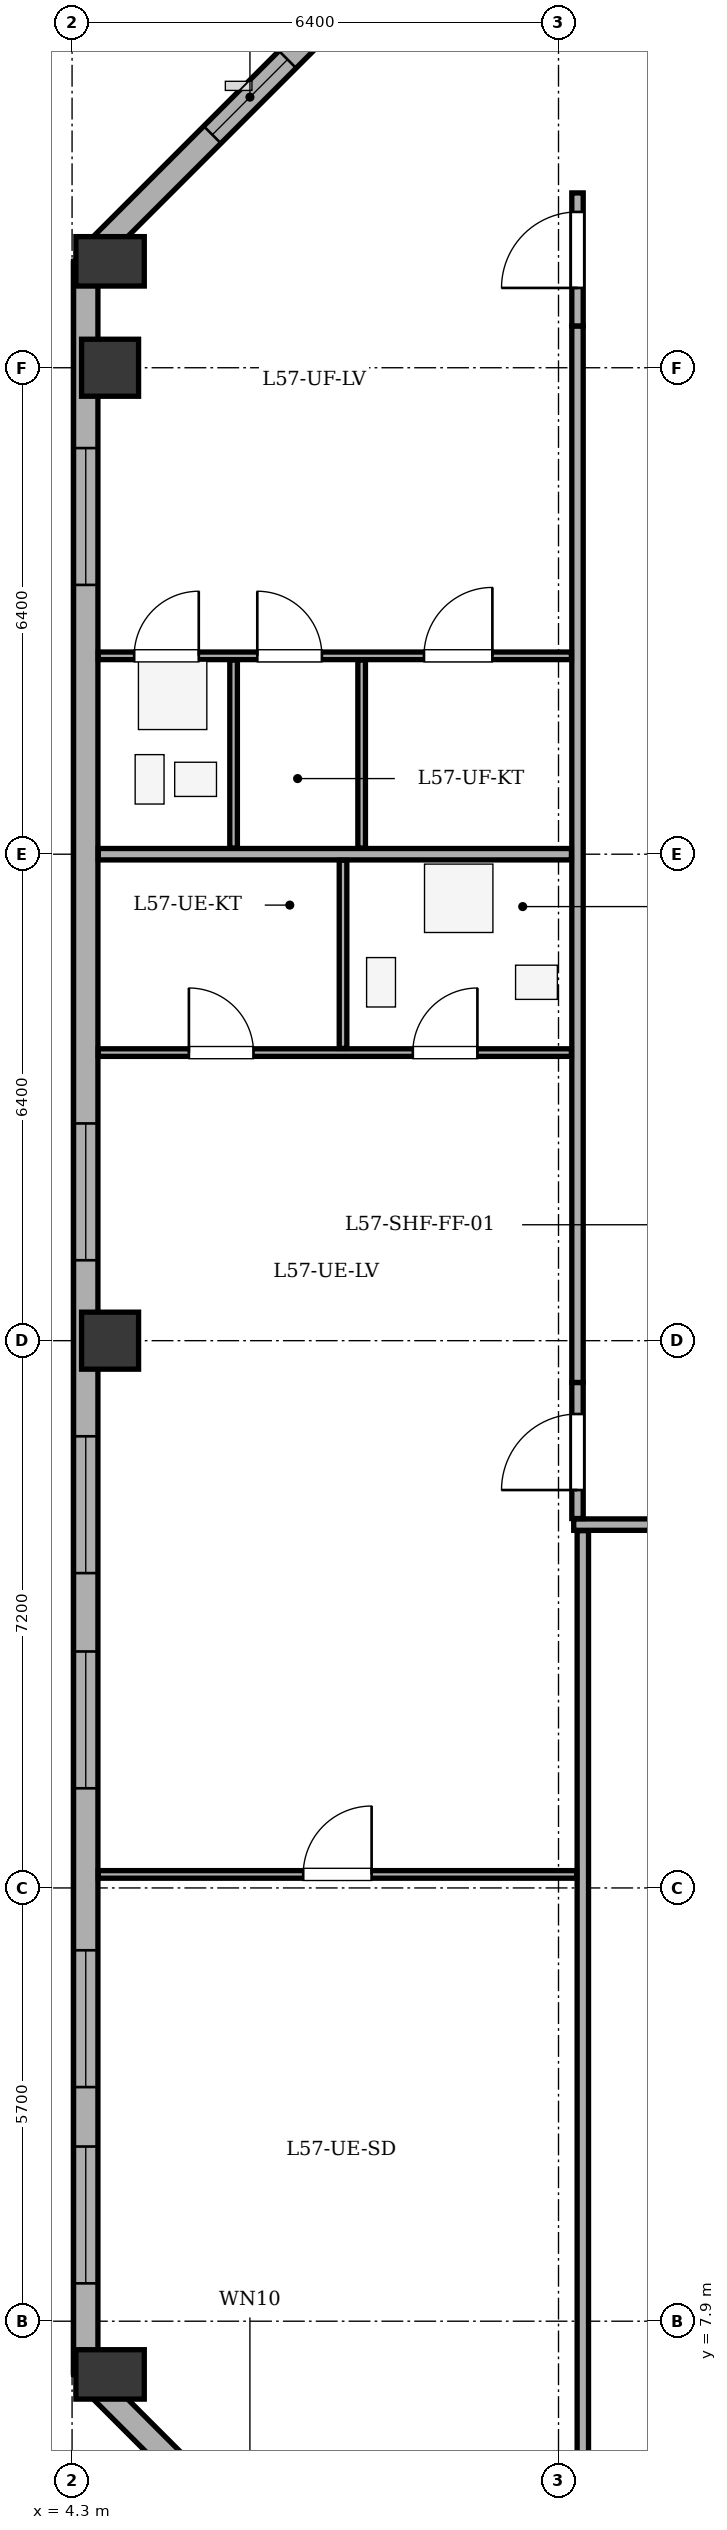
"""IFC4 building model, lengths in metres.
Left out: names, types, materials, properties, quantities, classifications, styles, units other than length and angle.
Written with IfcOpenShell. Run it as: python <this file> out.ifc"""

import sys

from ifc_helpers import new_model, si_unit, direction, frame, frame_2d, origin, origin_2d, place, context, subcontext, project, spatial, rectangle, extrude, element, fill, save


model = new_model("IFC4")
c1 = context("Model", 3, precision=1e-05, world=origin(), true_north=direction((0.0, 1.0)))
c2 = subcontext(c1, "Body", "Model", "MODEL_VIEW")
j1 = project(units=[si_unit("LENGTHUNIT", "METRE"), si_unit("PLANEANGLEUNIT", "RADIAN")], contexts=[c1])
p1 = place(None, origin())
s1 = spatial("IfcSite", under=j1, at=p1, CompositionType="ELEMENT")
p2 = place(p1, origin())
s2 = spatial("IfcBuilding", under=s1, at=p2, CompositionType="ELEMENT")
p3 = place(p2, frame((0.0, 0.0, 221.1)))
s3 = spatial("IfcBuildingStorey", under=s2, at=p3, CompositionType="ELEMENT", Elevation=221.1)
p4 = place(p3, frame((4.8, 7.2, 0.0), z_axis=(0.0, 0.0, 1.0), x_axis=(1.0, 0.0, 0.0)))
e1 = element("IfcColumn", 1, at=p4, inside=s3, PredefinedType="COLUMN", context=c2, shape_type="SweptSolid", body=[
    extrude(rectangle(XDim=0.65, YDim=0.9, at=origin_2d()), origin(), (0.0, 0.0, 1.0), 3.4),
])
for number, where, z_axis, x_axis in (
    (2, (4.8, 20.8, 0.0), (0.0, 0.0, 1.0), (1.0, 0.0, 0.0)),
    (3, (4.8, 33.6, 0.0), (0.0, 0.0, 1.0), (1.0, 0.0, 0.0)),
):
    element("IfcColumn", number, at=place(p3, frame(where, z_axis=z_axis, x_axis=x_axis)), inside=s3, PredefinedType="COLUMN", context=c2, shape_type="SweptSolid", body=[
        extrude(rectangle(XDim=0.75, YDim=0.75, at=origin_2d()), origin(), (0.0, 0.0, 1.0), 3.4),
    ])
p5 = place(p3, frame((4.8, 35.0, 0.0), z_axis=(0.0, 0.0, 1.0), x_axis=(1.0, 0.0, 0.0)))
e4 = element("IfcColumn", 4, at=p5, inside=s3, PredefinedType="COLUMN", context=c2, shape_type="SweptSolid", body=[
    extrude(rectangle(XDim=0.65, YDim=0.9, at=origin_2d()), origin(), (0.0, 0.0, 1.0), 3.4),
])
p6 = place(p3, frame((8.8, 2.88, 0.0), z_axis=(0.0, 0.0, 1.0), x_axis=(-0.707106781187, 0.707106781187, 0.0)))
e5 = element("IfcWall", 5, at=p6, inside=s3, PredefinedType="STANDARD", context=c2, shape_type="SweptSolid", body=[
    extrude(rectangle(XDim=6.11, YDim=0.32, at=frame_2d((3.055, 0.0))), origin(), (0.0, 0.0, 1.0), 2.725),
])
p7 = place(p6, frame((2.355, 0.0, 0.75)))
e6 = element("IfcOpeningElement", 6, at=p7, cuts=e5, PredefinedType="OPENING", context=c2, shape_type="SweptSolid", body=[
    extrude(rectangle(XDim=1.4, YDim=1.65, at=frame_2d((0.7, 0.825))), frame((0.0, 0.17, 0.0), z_axis=(0.0, -1.0, 0.0), x_axis=(1.0, 0.0, 0.0)), (0.0, 0.0, 1.0), 0.34),
])
p8 = place(p3, frame((4.48, 7.2, 0.0), z_axis=(0.0, 0.0, 1.0), x_axis=(0.0, 1.0, 0.0)))
e7 = element("IfcWall", 7, at=p8, inside=s3, PredefinedType="STANDARD", context=c2, shape_type="SweptSolid", body=[
    extrude(rectangle(XDim=27.8, YDim=0.32, at=frame_2d((13.9, 0.0))), origin(), (0.0, 0.0, 1.0), 2.725),
])
p9 = place(p8, frame((1.198, 0.0, 0.75)))
e8 = element("IfcOpeningElement", 8, at=p9, cuts=e7, PredefinedType="OPENING", context=c2, shape_type="SweptSolid", body=[
    extrude(rectangle(XDim=1.8, YDim=1.7, at=frame_2d((0.9, 0.85))), frame((0.0, 0.17, 0.0), z_axis=(0.0, -1.0, 0.0), x_axis=(1.0, 0.0, 0.0)), (0.0, 0.0, 1.0), 0.34),
])
p10 = place(p8, frame((3.78, 0.0, 0.75)))
e9 = element("IfcOpeningElement", 9, at=p10, cuts=e7, PredefinedType="OPENING", context=c2, shape_type="SweptSolid", body=[
    extrude(rectangle(XDim=1.8, YDim=1.7, at=frame_2d((0.9, 0.85))), frame((0.0, 0.17, 0.0), z_axis=(0.0, -1.0, 0.0), x_axis=(1.0, 0.0, 0.0)), (0.0, 0.0, 1.0), 0.34),
])
p11 = place(p8, frame((7.711, 0.0, 0.75)))
e10 = element("IfcOpeningElement", 10, at=p11, cuts=e7, PredefinedType="OPENING", context=c2, shape_type="SweptSolid", body=[
    extrude(rectangle(XDim=1.8, YDim=1.7, at=frame_2d((0.9, 0.85))), frame((0.0, 0.17, 0.0), z_axis=(0.0, -1.0, 0.0), x_axis=(1.0, 0.0, 0.0)), (0.0, 0.0, 1.0), 0.34),
])
p12 = place(p8, frame((10.542, 0.0, 0.75)))
e11 = element("IfcOpeningElement", 11, at=p12, cuts=e7, PredefinedType="OPENING", context=c2, shape_type="SweptSolid", body=[
    extrude(rectangle(XDim=1.8, YDim=1.7, at=frame_2d((0.9, 0.85))), frame((0.0, 0.17, 0.0), z_axis=(0.0, -1.0, 0.0), x_axis=(1.0, 0.0, 0.0)), (0.0, 0.0, 1.0), 0.34),
])
p13 = place(p8, frame((14.658, 0.0, 0.75)))
e12 = element("IfcOpeningElement", 12, at=p13, cuts=e7, PredefinedType="OPENING", context=c2, shape_type="SweptSolid", body=[
    extrude(rectangle(XDim=1.8, YDim=1.7, at=frame_2d((0.9, 0.85))), frame((0.0, 0.17, 0.0), z_axis=(0.0, -1.0, 0.0), x_axis=(1.0, 0.0, 0.0)), (0.0, 0.0, 1.0), 0.34),
])
p14 = place(p8, frame((23.543, 0.0, 0.75)))
e13 = element("IfcOpeningElement", 13, at=p14, cuts=e7, PredefinedType="OPENING", context=c2, shape_type="SweptSolid", body=[
    extrude(rectangle(XDim=1.8, YDim=1.7, at=frame_2d((0.9, 0.85))), frame((0.0, 0.17, 0.0), z_axis=(0.0, -1.0, 0.0), x_axis=(1.0, 0.0, 0.0)), (0.0, 0.0, 1.0), 0.34),
])
p15 = place(p3, frame((4.48, 35.0, 0.0), z_axis=(0.0, 0.0, 1.0), x_axis=(0.707106781187, 0.707106781187, 0.0)))
e14 = element("IfcWall", 14, at=p15, inside=s3, PredefinedType="STANDARD", context=c2, shape_type="SweptSolid", body=[
    extrude(rectangle(XDim=6.11, YDim=0.32, at=frame_2d((3.055, 0.0))), origin(), (0.0, 0.0, 1.0), 2.725),
])
p16 = place(p15, frame((2.355, 0.0, 0.75)))
e15 = element("IfcOpeningElement", 15, at=p16, cuts=e14, PredefinedType="OPENING", context=c2, shape_type="SweptSolid", body=[
    extrude(rectangle(XDim=1.4, YDim=1.65, at=frame_2d((0.7, 0.825))), frame((0.0, 0.17, 0.0), z_axis=(0.0, -1.0, 0.0), x_axis=(1.0, 0.0, 0.0)), (0.0, 0.0, 1.0), 0.34),
])
p17 = place(p3, frame((10.9, 18.38, 0.0), z_axis=(0.0, 0.0, 1.0), x_axis=(1.0, 0.0, 0.0)))
e16 = element("IfcWall", 16, at=p17, inside=s3, PredefinedType="PARTITIONING", context=c2, shape_type="SweptSolid", body=[
    extrude(rectangle(XDim=34.02, YDim=0.15, at=frame_2d((17.01, 0.0))), origin(), (0.0, 0.0, 1.0), 3.1),
])
p18 = place(p17, frame((3.674, 0.0, 0.0)))
e17 = element("IfcOpeningElement", 17, at=p18, cuts=e16, PredefinedType="OPENING", context=c2, shape_type="SweptSolid", body=[
    extrude(rectangle(XDim=1.0, YDim=2.1, at=frame_2d((0.5, 1.05))), frame((0.0, 0.085, 0.0), z_axis=(0.0, -1.0, 0.0), x_axis=(1.0, 0.0, 0.0)), (0.0, 0.0, 1.0), 0.17),
])
p19 = place(p17, frame((12.118, 0.0, 0.0)))
e18 = element("IfcOpeningElement", 18, at=p19, cuts=e16, PredefinedType="OPENING", context=c2, shape_type="SweptSolid", body=[
    extrude(rectangle(XDim=1.0, YDim=2.1, at=frame_2d((0.5, 1.05))), frame((0.0, 0.085, 0.0), z_axis=(0.0, -1.0, 0.0), x_axis=(1.0, 0.0, 0.0)), (0.0, 0.0, 1.0), 0.17),
])
p20 = place(p17, frame((20.901, 0.0, 0.0)))
e19 = element("IfcOpeningElement", 19, at=p20, cuts=e16, PredefinedType="OPENING", context=c2, shape_type="SweptSolid", body=[
    extrude(rectangle(XDim=1.0, YDim=2.1, at=frame_2d((0.5, 1.05))), frame((0.0, 0.085, 0.0), z_axis=(0.0, -1.0, 0.0), x_axis=(1.0, 0.0, 0.0)), (0.0, 0.0, 1.0), 0.17),
])
p21 = place(p17, frame((29.346, 0.0, 0.0)))
e20 = element("IfcOpeningElement", 20, at=p21, cuts=e16, PredefinedType="OPENING", context=c2, shape_type="SweptSolid", body=[
    extrude(rectangle(XDim=1.0, YDim=2.1, at=frame_2d((0.5, 1.05))), frame((0.0, 0.085, 0.0), z_axis=(0.0, -1.0, 0.0), x_axis=(1.0, 0.0, 0.0)), (0.0, 0.0, 1.0), 0.17),
])
p22 = place(p3, frame((11.02, 3.045, 0.0), z_axis=(0.0, 0.0, 1.0), x_axis=(0.0, 1.0, 0.0)))
e21 = element("IfcWall", 21, at=p22, inside=s3, PredefinedType="PARTITIONING", context=c2, shape_type="SweptSolid", body=[
    extrude(rectangle(XDim=15.255, YDim=0.15, at=frame_2d((7.627, 0.0))), origin(), (0.0, 0.0, 1.0), 3.1),
])
p23 = place(p3, frame((10.95, 18.46, 0.0), z_axis=(0.0, 0.0, 1.0), x_axis=(0.0, 1.0, 0.0)))
e22 = element("IfcWall", 22, at=p23, inside=s3, PredefinedType="PARTITIONING", context=c2, shape_type="SweptSolid", body=[
    extrude(rectangle(XDim=1.79, YDim=0.15, at=frame_2d((0.895, 0.0))), origin(), (0.0, 0.0, 1.0), 3.1),
])
p24 = place(p23, frame((0.375, 0.0, 0.0)))
e23 = element("IfcOpeningElement", 23, at=p24, cuts=e22, PredefinedType="OPENING", context=c2, shape_type="SweptSolid", body=[
    extrude(rectangle(XDim=1.0, YDim=2.1, at=frame_2d((0.5, 1.05))), frame((0.0, 0.085, 0.0), z_axis=(0.0, -1.0, 0.0), x_axis=(1.0, 0.0, 0.0)), (0.0, 0.0, 1.0), 0.17),
])
p25 = place(p3, frame((10.95, 20.25, 0.0), z_axis=(0.0, 0.0, 1.0), x_axis=(0.0, 1.0, 0.0)))
e24 = element("IfcWall", 24, at=p25, inside=s3, PredefinedType="PARTITIONING", context=c2, shape_type="SweptSolid", body=[
    extrude(rectangle(XDim=13.9, YDim=0.15, at=frame_2d((6.95, 0.0))), origin(), (0.0, 0.0, 1.0), 3.1),
])
p26 = place(p3, frame((10.95, 34.15, 0.0), z_axis=(0.0, 0.0, 1.0), x_axis=(0.0, 1.0, 0.0)))
e25 = element("IfcWall", 25, at=p26, inside=s3, PredefinedType="PARTITIONING", context=c2, shape_type="SweptSolid", body=[
    extrude(rectangle(XDim=1.75, YDim=0.15, at=frame_2d((0.875, 0.0))), origin(), (0.0, 0.0, 1.0), 3.1),
])
p27 = place(p26, frame((0.5, 0.0, 0.0)))
e26 = element("IfcOpeningElement", 26, at=p27, cuts=e25, PredefinedType="OPENING", context=c2, shape_type="SweptSolid", body=[
    extrude(rectangle(XDim=1.0, YDim=2.1, at=frame_2d((0.5, 1.05))), frame((0.0, 0.085, 0.0), z_axis=(0.0, -1.0, 0.0), x_axis=(1.0, 0.0, 0.0)), (0.0, 0.0, 1.0), 0.17),
])
p28 = place(p3, frame((4.645, 27.2, 0.0), z_axis=(0.0, 0.0, 1.0), x_axis=(1.0, 0.0, 0.0)))
e27 = element("IfcWall", 27, at=p28, inside=s3, PredefinedType="PARTITIONING", context=c2, shape_type="SweptSolid", body=[
    extrude(rectangle(XDim=6.225, YDim=0.15, at=frame_2d((3.113, 0.0))), origin(), (0.0, 0.0, 1.0), 2.725),
])
p29 = place(p3, frame((4.645, 24.59, 0.0), z_axis=(0.0, 0.0, 1.0), x_axis=(1.0, 0.0, 0.0)))
e28 = element("IfcWall", 28, at=p29, inside=s3, PredefinedType="PARTITIONING", context=c2, shape_type="SweptSolid", body=[
    extrude(rectangle(XDim=6.225, YDim=0.1, at=frame_2d((3.113, 0.0))), origin(), (0.0, 0.0, 1.0), 3.1),
])
p30 = place(p29, frame((1.192, 0.0, 0.0)))
e29 = element("IfcOpeningElement", 29, at=p30, cuts=e28, PredefinedType="OPENING", context=c2, shape_type="SweptSolid", body=[
    extrude(rectangle(XDim=0.85, YDim=2.05, at=frame_2d((0.425, 1.025))), frame((0.0, 0.06, 0.0), z_axis=(0.0, -1.0, 0.0), x_axis=(1.0, 0.0, 0.0)), (0.0, 0.0, 1.0), 0.12),
])
p31 = place(p29, frame((4.138, 0.0, 0.0)))
e30 = element("IfcOpeningElement", 30, at=p31, cuts=e28, PredefinedType="OPENING", context=c2, shape_type="SweptSolid", body=[
    extrude(rectangle(XDim=0.85, YDim=2.05, at=frame_2d((0.425, 1.025))), frame((0.0, 0.06, 0.0), z_axis=(0.0, -1.0, 0.0), x_axis=(1.0, 0.0, 0.0)), (0.0, 0.0, 1.0), 0.12),
])
p32 = place(p3, frame((4.645, 13.778, 0.0), z_axis=(0.0, 0.0, 1.0), x_axis=(1.0, 0.0, 0.0)))
e31 = element("IfcWall", 31, at=p32, inside=s3, PredefinedType="PARTITIONING", context=c2, shape_type="SweptSolid", body=[
    extrude(rectangle(XDim=6.295, YDim=0.1, at=frame_2d((3.147, 0.0))), origin(), (0.0, 0.0, 1.0), 3.1),
])
p33 = place(p32, frame((2.696, 0.0, 0.0)))
e32 = element("IfcOpeningElement", 32, at=p33, cuts=e31, PredefinedType="OPENING", context=c2, shape_type="SweptSolid", body=[
    extrude(rectangle(XDim=0.9, YDim=2.05, at=frame_2d((0.45, 1.025))), frame((0.0, 0.06, 0.0), z_axis=(0.0, -1.0, 0.0), x_axis=(1.0, 0.0, 0.0)), (0.0, 0.0, 1.0), 0.12),
])
p34 = place(p3, frame((7.865, 24.645, 0.0), z_axis=(0.0, 0.0, 1.0), x_axis=(0.0, 1.0, 0.0)))
e33 = element("IfcWall", 33, at=p34, inside=s3, PredefinedType="PARTITIONING", context=c2, shape_type="SweptSolid", body=[
    extrude(rectangle(XDim=2.475, YDim=0.1, at=frame_2d((1.238, 0.0))), origin(), (0.0, 0.0, 1.0), 3.1),
])
p35 = place(p3, frame((4.645, 29.81, 0.0), z_axis=(0.0, 0.0, 1.0), x_axis=(1.0, 0.0, 0.0)))
e34 = element("IfcWall", 34, at=p35, inside=s3, PredefinedType="PARTITIONING", context=c2, shape_type="SweptSolid", body=[
    extrude(rectangle(XDim=6.225, YDim=0.1, at=frame_2d((3.113, 0.0))), origin(), (0.0, 0.0, 1.0), 3.1),
])
p36 = place(p35, frame((0.472, 0.0, 0.0)))
e35 = element("IfcOpeningElement", 35, at=p36, cuts=e34, PredefinedType="OPENING", context=c2, shape_type="SweptSolid", body=[
    extrude(rectangle(XDim=0.85, YDim=2.05, at=frame_2d((0.425, 1.025))), frame((0.0, 0.06, 0.0), z_axis=(0.0, -1.0, 0.0), x_axis=(1.0, 0.0, 0.0)), (0.0, 0.0, 1.0), 0.12),
])
p37 = place(p35, frame((2.092, 0.0, 0.0)))
e36 = element("IfcOpeningElement", 36, at=p37, cuts=e34, PredefinedType="OPENING", context=c2, shape_type="SweptSolid", body=[
    extrude(rectangle(XDim=0.85, YDim=2.05, at=frame_2d((0.425, 1.025))), frame((0.0, 0.06, 0.0), z_axis=(0.0, -1.0, 0.0), x_axis=(1.0, 0.0, 0.0)), (0.0, 0.0, 1.0), 0.12),
])
p38 = place(p35, frame((4.285, 0.0, 0.0)))
e37 = element("IfcOpeningElement", 37, at=p38, cuts=e34, PredefinedType="OPENING", context=c2, shape_type="SweptSolid", body=[
    extrude(rectangle(XDim=0.9, YDim=2.05, at=frame_2d((0.45, 1.025))), frame((0.0, 0.06, 0.0), z_axis=(0.0, -1.0, 0.0), x_axis=(1.0, 0.0, 0.0)), (0.0, 0.0, 1.0), 0.12),
])
for number, where, z_axis, x_axis in (
    (38, (6.425, 27.28, 0.0), (0.0, 0.0, 1.0), (0.0, 1.0, 0.0)),
    (39, (8.11, 27.28, 0.0), (0.0, 0.0, 1.0), (0.0, 1.0, 0.0)),
):
    element("IfcWall", number, at=place(p3, frame(where, z_axis=z_axis, x_axis=x_axis)), inside=s3, PredefinedType="PARTITIONING", context=c2, shape_type="SweptSolid", body=[
        extrude(rectangle(XDim=2.475, YDim=0.1, at=frame_2d((1.237, 0.0))), origin(), (0.0, 0.0, 1.0), 3.1),
    ])
p39 = place(p9, origin())
e40 = element("IfcWindow", 40, at=p39, inside=s3, PartitioningType="SINGLE_PANEL", PredefinedType="WINDOW", context=c2, shape_type="SweptSolid", body=[
    extrude(rectangle(XDim=1.8, YDim=1.7, at=frame_2d((0.9, 0.85))), frame((0.0, -0.01, 0.0), z_axis=(0.0, -1.0, 0.0), x_axis=(1.0, 0.0, 0.0)), (0.0, 0.0, 1.0), 0.06),
])
fill(e8, e40)
p40 = place(p10, origin())
e41 = element("IfcWindow", 41, at=p40, inside=s3, PartitioningType="SINGLE_PANEL", PredefinedType="WINDOW", context=c2, shape_type="SweptSolid", body=[
    extrude(rectangle(XDim=1.8, YDim=1.7, at=frame_2d((0.9, 0.85))), frame((0.0, -0.01, 0.0), z_axis=(0.0, -1.0, 0.0), x_axis=(1.0, 0.0, 0.0)), (0.0, 0.0, 1.0), 0.06),
])
fill(e9, e41)
p41 = place(p11, origin())
e42 = element("IfcWindow", 42, at=p41, inside=s3, PartitioningType="SINGLE_PANEL", PredefinedType="WINDOW", context=c2, shape_type="SweptSolid", body=[
    extrude(rectangle(XDim=1.8, YDim=1.7, at=frame_2d((0.9, 0.85))), frame((0.0, -0.01, 0.0), z_axis=(0.0, -1.0, 0.0), x_axis=(1.0, 0.0, 0.0)), (0.0, 0.0, 1.0), 0.06),
])
fill(e10, e42)
p42 = place(p12, origin())
e43 = element("IfcWindow", 43, at=p42, inside=s3, PartitioningType="SINGLE_PANEL", PredefinedType="WINDOW", context=c2, shape_type="SweptSolid", body=[
    extrude(rectangle(XDim=1.8, YDim=1.7, at=frame_2d((0.9, 0.85))), frame((0.0, -0.01, 0.0), z_axis=(0.0, -1.0, 0.0), x_axis=(1.0, 0.0, 0.0)), (0.0, 0.0, 1.0), 0.06),
])
fill(e11, e43)
p43 = place(p13, origin())
e44 = element("IfcWindow", 44, at=p43, inside=s3, PartitioningType="SINGLE_PANEL", PredefinedType="WINDOW", context=c2, shape_type="SweptSolid", body=[
    extrude(rectangle(XDim=1.8, YDim=1.7, at=frame_2d((0.9, 0.85))), frame((0.0, -0.01, 0.0), z_axis=(0.0, -1.0, 0.0), x_axis=(1.0, 0.0, 0.0)), (0.0, 0.0, 1.0), 0.06),
])
fill(e12, e44)
p44 = place(p14, origin())
e45 = element("IfcWindow", 45, at=p44, inside=s3, PartitioningType="SINGLE_PANEL", PredefinedType="WINDOW", context=c2, shape_type="SweptSolid", body=[
    extrude(rectangle(XDim=1.8, YDim=1.7, at=frame_2d((0.9, 0.85))), frame((0.0, -0.01, 0.0), z_axis=(0.0, -1.0, 0.0), x_axis=(1.0, 0.0, 0.0)), (0.0, 0.0, 1.0), 0.06),
])
fill(e13, e45)
p45 = place(p16, origin())
e46 = element("IfcWindow", 46, at=p45, inside=s3, PartitioningType="SINGLE_PANEL", PredefinedType="WINDOW", context=c2, shape_type="SweptSolid", body=[
    extrude(rectangle(XDim=1.4, YDim=1.65, at=frame_2d((0.7, 0.825))), frame((0.0, -0.01, 0.0), z_axis=(0.0, -1.0, 0.0), x_axis=(1.0, 0.0, 0.0)), (0.0, 0.0, 1.0), 0.06),
])
fill(e15, e46)
p46 = place(p24, origin())
e47 = element("IfcDoor", 47, at=p46, inside=s3, OperationType="SINGLE_SWING_LEFT", PredefinedType="DOOR", context=c2, shape_type="SweptSolid", body=[
    extrude(rectangle(XDim=1.0, YDim=2.1, at=frame_2d((0.5, 1.05))), frame((0.0, 0.025, 0.0), z_axis=(0.0, -1.0, 0.0), x_axis=(1.0, 0.0, 0.0)), (0.0, 0.0, 1.0), 0.05),
])
fill(e23, e47)
p47 = place(p33, origin())
e48 = element("IfcDoor", 48, at=p47, inside=s3, OperationType="SINGLE_SWING_RIGHT", PredefinedType="DOOR", context=c2, shape_type="SweptSolid", body=[
    extrude(rectangle(XDim=0.9, YDim=2.05, at=frame_2d((0.45, 1.025))), frame((0.0, 0.025, 0.0), z_axis=(0.0, -1.0, 0.0), x_axis=(1.0, 0.0, 0.0)), (0.0, 0.0, 1.0), 0.05),
])
fill(e32, e48)
p48 = place(p30, origin())
e49 = element("IfcDoor", 49, at=p48, inside=s3, OperationType="SINGLE_SWING_LEFT", PredefinedType="DOOR", context=c2, shape_type="SweptSolid", body=[
    extrude(rectangle(XDim=0.85, YDim=2.05, at=frame_2d((0.425, 1.025))), frame((0.0, 0.025, 0.0), z_axis=(0.0, -1.0, 0.0), x_axis=(1.0, 0.0, 0.0)), (0.0, 0.0, 1.0), 0.05),
])
fill(e29, e49)
p49 = place(p31, origin())
e50 = element("IfcDoor", 50, at=p49, inside=s3, OperationType="SINGLE_SWING_RIGHT", PredefinedType="DOOR", context=c2, shape_type="SweptSolid", body=[
    extrude(rectangle(XDim=0.85, YDim=2.05, at=frame_2d((0.425, 1.025))), frame((0.0, 0.025, 0.0), z_axis=(0.0, -1.0, 0.0), x_axis=(1.0, 0.0, 0.0)), (0.0, 0.0, 1.0), 0.05),
])
fill(e30, e50)
p50 = place(p27, origin())
e51 = element("IfcDoor", 51, at=p50, inside=s3, OperationType="SINGLE_SWING_LEFT", PredefinedType="DOOR", context=c2, shape_type="SweptSolid", body=[
    extrude(rectangle(XDim=1.0, YDim=2.1, at=frame_2d((0.5, 1.05))), frame((0.0, 0.025, 0.0), z_axis=(0.0, -1.0, 0.0), x_axis=(1.0, 0.0, 0.0)), (0.0, 0.0, 1.0), 0.05),
])
fill(e26, e51)
p51 = place(p36, origin())
e52 = element("IfcDoor", 52, at=p51, inside=s3, OperationType="SINGLE_SWING_RIGHT", PredefinedType="DOOR", context=c2, shape_type="SweptSolid", body=[
    extrude(rectangle(XDim=0.85, YDim=2.05, at=frame_2d((0.425, 1.025))), frame((0.0, 0.025, 0.0), z_axis=(0.0, -1.0, 0.0), x_axis=(1.0, 0.0, 0.0)), (0.0, 0.0, 1.0), 0.05),
])
fill(e35, e52)
p52 = place(p37, origin())
e53 = element("IfcDoor", 53, at=p52, inside=s3, OperationType="SINGLE_SWING_LEFT", PredefinedType="DOOR", context=c2, shape_type="SweptSolid", body=[
    extrude(rectangle(XDim=0.85, YDim=2.05, at=frame_2d((0.425, 1.025))), frame((0.0, 0.025, 0.0), z_axis=(0.0, -1.0, 0.0), x_axis=(1.0, 0.0, 0.0)), (0.0, 0.0, 1.0), 0.05),
])
fill(e36, e53)
p53 = place(p38, origin())
e54 = element("IfcDoor", 54, at=p53, inside=s3, OperationType="SINGLE_SWING_RIGHT", PredefinedType="DOOR", context=c2, shape_type="SweptSolid", body=[
    extrude(rectangle(XDim=0.9, YDim=2.05, at=frame_2d((0.45, 1.025))), frame((0.0, 0.025, 0.0), z_axis=(0.0, -1.0, 0.0), x_axis=(1.0, 0.0, 0.0)), (0.0, 0.0, 1.0), 0.05),
])
fill(e37, e54)
save(model, sys.argv[1])
